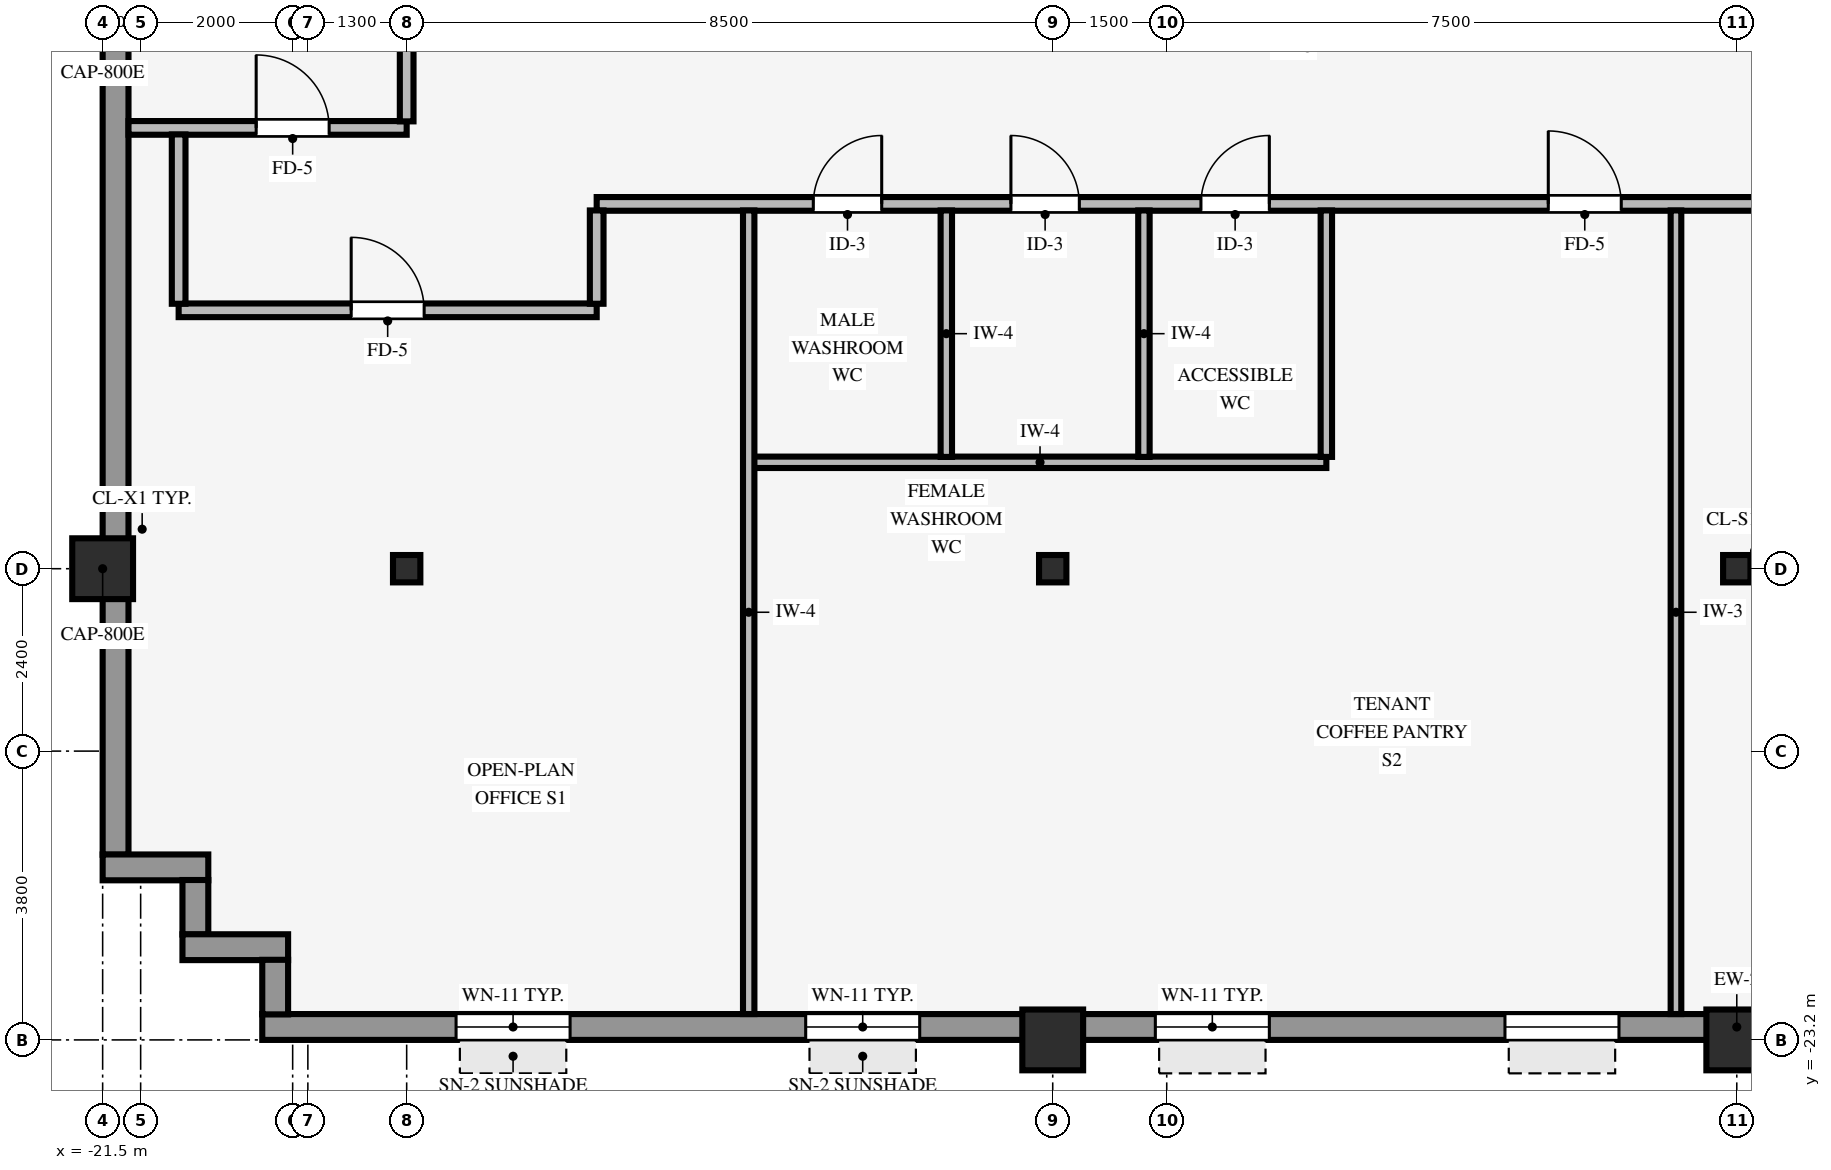
"""IFC4 building model, lengths in metres.
Left out: names, types, materials, properties, quantities, classifications, styles, units other than length and angle.
Written with IfcOpenShell. Run it as: python <this file> out.ifc"""

import sys

from ifc_helpers import new_model, si_unit, direction, frame, frame_2d, origin, origin_2d, place, context, subcontext, project, spatial, rectangle, hollow_rectangle, i_section, extrude, source, transform, mapped, element, fill, save


model = new_model("IFC4")
c1 = context("Model", 3, precision=1e-05, world=origin(), true_north=direction((0.0, 1.0)))
c2 = subcontext(c1, "Body", "Model", "MODEL_VIEW")
j1 = project(units=[si_unit("LENGTHUNIT", "METRE"), si_unit("PLANEANGLEUNIT", "RADIAN")], contexts=[c1])
p1 = place(None, origin())
s1 = spatial("IfcSite", under=j1, at=p1, CompositionType="ELEMENT")
p2 = place(p1, origin())
s2 = spatial("IfcBuilding", under=s1, at=p2, CompositionType="ELEMENT")
p3 = place(p2, frame((0.0, 0.0, 82.35)))
s3 = spatial("IfcBuildingStorey", under=s2, at=p3, CompositionType="ELEMENT", Elevation=82.35)
for number, where, z_axis, x_axis in (
    (1, (-21.5, -17.0, 0.0), (0.0, 0.0, 1.0), (1.0, 0.0, 0.0)),
    (2, (-9.0, -23.2, 0.0), (0.0, 0.0, 1.0), (1.0, 0.0, 0.0)),
    (3, (0.0, -23.2, 0.0), (0.0, 0.0, 1.0), (1.0, 0.0, 0.0)),
):
    element("IfcColumn", number, at=place(p3, frame(where, z_axis=z_axis, x_axis=x_axis)), inside=s3, PredefinedType="COLUMN", context=c2, shape_type="SweptSolid", body=[
        extrude(hollow_rectangle(XDim=0.8, YDim=0.8, WallThickness=0.055, InnerFilletRadius=0.055, OuterFilletRadius=0.11, at=origin_2d()), origin(), (0.0, 0.0, 1.0), 3.25),
    ])
for number, where, z_axis, x_axis in (
    (4, (0.0, -17.0, 0.0), (0.0, 0.0, 1.0), (1.0, 0.0, 0.0)),
    (5, (-17.5, -17.0, 0.0), (0.0, 0.0, 1.0), (1.0, 0.0, 0.0)),
    (6, (-9.0, -17.0, 0.0), (0.0, 0.0, 1.0), (1.0, 0.0, 0.0)),
):
    element("IfcColumn", number, at=place(p3, frame(where, z_axis=z_axis, x_axis=x_axis)), inside=s3, PredefinedType="COLUMN", context=c2, shape_type="SweptSolid", body=[
        extrude(i_section(OverallWidth=0.36, OverallDepth=0.36, WebThickness=0.021, FlangeThickness=0.021, FilletRadius=0.018, at=origin_2d()), origin(), (0.0, 0.0, 1.0), 3.25),
    ])
p4 = place(p3, frame((-19.4, -23.03, 0.0), z_axis=(0.0, 0.0, 1.0), x_axis=(1.0, 0.0, 0.0)))
e7 = element("IfcWall", 7, at=p4, inside=s3, PredefinedType="STANDARD", context=c2, shape_type="SweptSolid", body=[
    extrude(rectangle(XDim=38.8, YDim=0.34, at=frame_2d((19.4, 0.0))), origin(), (0.0, 0.0, 1.0), 2.585),
])
p5 = place(p4, frame((2.55, 0.0, 0.8)))
e8 = element("IfcOpeningElement", 8, at=p5, cuts=e7, PredefinedType="OPENING", context=c2, shape_type="SweptSolid", body=[
    extrude(rectangle(XDim=1.5, YDim=1.6, at=frame_2d((0.75, 0.8))), frame((0.0, 0.18, 0.0), z_axis=(0.0, -1.0, 0.0), x_axis=(1.0, 0.0, 0.0)), (0.0, 0.0, 1.0), 0.36),
])
p6 = place(p4, frame((7.15, 0.0, 0.8)))
e9 = element("IfcOpeningElement", 9, at=p6, cuts=e7, PredefinedType="OPENING", context=c2, shape_type="SweptSolid", body=[
    extrude(rectangle(XDim=1.5, YDim=1.6, at=frame_2d((0.75, 0.8))), frame((0.0, 0.18, 0.0), z_axis=(0.0, -1.0, 0.0), x_axis=(1.0, 0.0, 0.0)), (0.0, 0.0, 1.0), 0.36),
])
p7 = place(p4, frame((11.75, 0.0, 0.8)))
e10 = element("IfcOpeningElement", 10, at=p7, cuts=e7, PredefinedType="OPENING", context=c2, shape_type="SweptSolid", body=[
    extrude(rectangle(XDim=1.5, YDim=1.6, at=frame_2d((0.75, 0.8))), frame((0.0, 0.18, 0.0), z_axis=(0.0, -1.0, 0.0), x_axis=(1.0, 0.0, 0.0)), (0.0, 0.0, 1.0), 0.36),
])
p8 = place(p4, frame((16.35, 0.0, 0.8)))
e11 = element("IfcOpeningElement", 11, at=p8, cuts=e7, PredefinedType="OPENING", context=c2, shape_type="SweptSolid", body=[
    extrude(rectangle(XDim=1.5, YDim=1.6, at=frame_2d((0.75, 0.8))), frame((0.0, 0.18, 0.0), z_axis=(0.0, -1.0, 0.0), x_axis=(1.0, 0.0, 0.0)), (0.0, 0.0, 1.0), 0.36),
])
p9 = place(p4, frame((20.95, 0.0, 0.8)))
e12 = element("IfcOpeningElement", 12, at=p9, cuts=e7, PredefinedType="OPENING", context=c2, shape_type="SweptSolid", body=[
    extrude(rectangle(XDim=1.5, YDim=1.6, at=frame_2d((0.75, 0.8))), frame((0.0, 0.18, 0.0), z_axis=(0.0, -1.0, 0.0), x_axis=(1.0, 0.0, 0.0)), (0.0, 0.0, 1.0), 0.36),
])
p10 = place(p4, frame((25.55, 0.0, 0.8)))
e13 = element("IfcOpeningElement", 13, at=p10, cuts=e7, PredefinedType="OPENING", context=c2, shape_type="SweptSolid", body=[
    extrude(rectangle(XDim=1.5, YDim=1.6, at=frame_2d((0.75, 0.8))), frame((0.0, 0.18, 0.0), z_axis=(0.0, -1.0, 0.0), x_axis=(1.0, 0.0, 0.0)), (0.0, 0.0, 1.0), 0.36),
])
p11 = place(p4, frame((30.15, 0.0, 0.8)))
e14 = element("IfcOpeningElement", 14, at=p11, cuts=e7, PredefinedType="OPENING", context=c2, shape_type="SweptSolid", body=[
    extrude(rectangle(XDim=1.5, YDim=1.6, at=frame_2d((0.75, 0.8))), frame((0.0, 0.18, 0.0), z_axis=(0.0, -1.0, 0.0), x_axis=(1.0, 0.0, 0.0)), (0.0, 0.0, 1.0), 0.36),
])
p12 = place(p4, frame((34.75, 0.0, 0.8)))
e15 = element("IfcOpeningElement", 15, at=p12, cuts=e7, PredefinedType="OPENING", context=c2, shape_type="SweptSolid", body=[
    extrude(rectangle(XDim=1.5, YDim=1.6, at=frame_2d((0.75, 0.8))), frame((0.0, 0.18, 0.0), z_axis=(0.0, -1.0, 0.0), x_axis=(1.0, 0.0, 0.0)), (0.0, 0.0, 1.0), 0.36),
])
p13 = place(p3, frame((-21.33, -20.764, 0.0), z_axis=(0.0, 0.0, 1.0), x_axis=(0.0, 1.0, 0.0)))
e16 = element("IfcWall", 16, at=p13, inside=s3, PredefinedType="STANDARD", context=c2, shape_type="SweptSolid", body=[
    extrude(rectangle(XDim=41.528, YDim=0.34, at=frame_2d((20.764, 0.0))), origin(), (0.0, 0.0, 1.0), 3.24),
])
p14 = place(p13, frame((15.364, 0.0, 0.0)))
e17 = element("IfcOpeningElement", 17, at=p14, cuts=e16, PredefinedType="OPENING", context=c2, shape_type="SweptSolid", body=[
    extrude(rectangle(XDim=1.05, YDim=2.1, at=frame_2d((0.525, 1.05))), frame((0.0, 0.18, 0.0), z_axis=(0.0, -1.0, 0.0), x_axis=(1.0, 0.0, 0.0)), (0.0, 0.0, 1.0), 0.36),
])
p15 = place(p13, frame((17.144, 0.0, 0.8)))
e18 = element("IfcOpeningElement", 18, at=p15, cuts=e16, PredefinedType="OPENING", context=c2, shape_type="SweptSolid", body=[
    extrude(rectangle(XDim=2.3, YDim=1.62, at=frame_2d((1.15, 0.81))), frame((0.0, 0.18, 0.0), z_axis=(0.0, -1.0, 0.0), x_axis=(1.0, 0.0, 0.0)), (0.0, 0.0, 1.0), 0.36),
])
p16 = place(p13, frame((22.084, 0.0, 0.8)))
e19 = element("IfcOpeningElement", 19, at=p16, cuts=e16, PredefinedType="OPENING", context=c2, shape_type="SweptSolid", body=[
    extrude(rectangle(XDim=2.3, YDim=1.62, at=frame_2d((1.15, 0.81))), frame((0.0, 0.18, 0.0), z_axis=(0.0, -1.0, 0.0), x_axis=(1.0, 0.0, 0.0)), (0.0, 0.0, 1.0), 0.36),
])
p17 = place(p3, frame((-21.5, -20.93, 0.0), z_axis=(0.0, 0.0, 1.0), x_axis=(1.0, 0.0, 0.0)))
e20 = element("IfcWall", 20, at=p17, inside=s3, PredefinedType="STANDARD", context=c2, shape_type="SweptSolid", body=[
    extrude(rectangle(XDim=1.39, YDim=0.34, at=frame_2d((0.695, 0.0))), origin(), (0.0, 0.0, 1.0), 3.24),
])
p18 = place(p3, frame((-20.28, -21.814, 0.0), z_axis=(0.0, 0.0, 1.0), x_axis=(0.0, 1.0, 0.0)))
e21 = element("IfcWall", 21, at=p18, inside=s3, PredefinedType="STANDARD", context=c2, shape_type="SweptSolid", body=[
    extrude(rectangle(XDim=0.718, YDim=0.34, at=frame_2d((0.359, 0.0))), origin(), (0.0, 0.0, 1.0), 3.24),
])
p19 = place(p3, frame((-20.45, -21.98, 0.0), z_axis=(0.0, 0.0, 1.0), x_axis=(1.0, 0.0, 0.0)))
e22 = element("IfcWall", 22, at=p19, inside=s3, PredefinedType="STANDARD", context=c2, shape_type="SweptSolid", body=[
    extrude(rectangle(XDim=1.39, YDim=0.34, at=frame_2d((0.695, 0.0))), origin(), (0.0, 0.0, 1.0), 3.24),
])
p20 = place(p3, frame((-19.23, -22.864, 0.0), z_axis=(0.0, 0.0, 1.0), x_axis=(0.0, 1.0, 0.0)))
e23 = element("IfcWall", 23, at=p20, inside=s3, PredefinedType="STANDARD", context=c2, shape_type="SweptSolid", body=[
    extrude(rectangle(XDim=0.718, YDim=0.34, at=frame_2d((0.359, 0.0))), origin(), (0.0, 0.0, 1.0), 3.24),
])
p21 = place(p3, frame((-12.934, -15.6, 0.0), z_axis=(0.0, 0.0, 1.0), x_axis=(1.0, 0.0, 0.0)))
e24 = element("IfcWall", 24, at=p21, inside=s3, PredefinedType="PARTITIONING", context=c2, shape_type="SweptSolid", body=[
    extrude(rectangle(XDim=7.534, YDim=0.15, at=frame_2d((3.767, 0.0))), origin(), (0.0, 0.0, 1.0), 3.24),
])
p22 = place(p3, frame((-20.5, -13.6, 0.0), z_axis=(0.0, 0.0, 1.0), x_axis=(1.0, 0.0, 0.0)))
e25 = element("IfcWall", 25, at=p22, inside=s3, PredefinedType="PARTITIONING", context=c2, shape_type="SweptSolid", body=[
    extrude(rectangle(XDim=5.5, YDim=0.18, at=frame_2d((2.75, 0.0))), origin(), (0.0, 0.0, 1.0), 2.878),
])
p23 = place(p22, frame((2.27, 0.0, 0.0)))
e26 = element("IfcOpeningElement", 26, at=p23, cuts=e25, PredefinedType="OPENING", context=c2, shape_type="SweptSolid", body=[
    extrude(rectangle(XDim=0.96, YDim=2.1, at=frame_2d((0.48, 1.05))), frame((0.0, 0.1, 0.0), z_axis=(0.0, -1.0, 0.0), x_axis=(1.0, 0.0, 0.0)), (0.0, 0.0, 1.0), 0.2),
])
p24 = place(p3, frame((-15.0, -12.2, 0.0), z_axis=(0.0, 0.0, 1.0), x_axis=(1.0, 0.0, 0.0)))
e27 = element("IfcWall", 27, at=p24, inside=s3, PredefinedType="PARTITIONING", context=c2, shape_type="SweptSolid", body=[
    extrude(rectangle(XDim=30.0, YDim=0.18, at=frame_2d((15.0, 0.0))), origin(), (0.0, 0.0, 1.0), 3.24),
])
p25 = place(p24, frame((19.07, 0.0, 0.0)))
e28 = element("IfcOpeningElement", 28, at=p25, cuts=e27, PredefinedType="OPENING", context=c2, shape_type="SweptSolid", body=[
    extrude(rectangle(XDim=0.96, YDim=2.1, at=frame_2d((0.48, 1.05))), frame((0.0, 0.1, 0.0), z_axis=(0.0, -1.0, 0.0), x_axis=(1.0, 0.0, 0.0)), (0.0, 0.0, 1.0), 0.2),
])
p26 = place(p24, frame((5.45, 0.0, 0.0)))
e29 = element("IfcOpeningElement", 29, at=p26, cuts=e27, PredefinedType="OPENING", context=c2, shape_type="SweptSolid", body=[
    extrude(rectangle(XDim=0.9, YDim=2.1, at=frame_2d((0.45, 1.05))), frame((0.0, 0.1, 0.0), z_axis=(0.0, -1.0, 0.0), x_axis=(1.0, 0.0, 0.0)), (0.0, 0.0, 1.0), 0.2),
])
p27 = place(p24, frame((2.85, 0.0, 0.0)))
e30 = element("IfcOpeningElement", 30, at=p27, cuts=e27, PredefinedType="OPENING", context=c2, shape_type="SweptSolid", body=[
    extrude(rectangle(XDim=0.9, YDim=2.1, at=frame_2d((0.45, 1.05))), frame((0.0, 0.1, 0.0), z_axis=(0.0, -1.0, 0.0), x_axis=(1.0, 0.0, 0.0)), (0.0, 0.0, 1.0), 0.2),
])
p28 = place(p24, frame((12.52, 0.0, 0.0)))
e31 = element("IfcOpeningElement", 31, at=p28, cuts=e27, PredefinedType="OPENING", context=c2, shape_type="SweptSolid", body=[
    extrude(rectangle(XDim=0.96, YDim=2.1, at=frame_2d((0.48, 1.05))), frame((0.0, 0.1, 0.0), z_axis=(0.0, -1.0, 0.0), x_axis=(1.0, 0.0, 0.0)), (0.0, 0.0, 1.0), 0.2),
])
p29 = place(p24, frame((7.95, 0.0, 0.0)))
e32 = element("IfcOpeningElement", 32, at=p29, cuts=e27, PredefinedType="OPENING", context=c2, shape_type="SweptSolid", body=[
    extrude(rectangle(XDim=0.9, YDim=2.1, at=frame_2d((0.45, 1.05))), frame((0.0, 0.1, 0.0), z_axis=(0.0, -1.0, 0.0), x_axis=(1.0, 0.0, 0.0)), (0.0, 0.0, 1.0), 0.2),
])
p30 = place(p3, frame((-21.16, -11.2, 0.0), z_axis=(0.0, 0.0, 1.0), x_axis=(1.0, 0.0, 0.0)))
e33 = element("IfcWall", 33, at=p30, inside=s3, PredefinedType="PARTITIONING", context=c2, shape_type="SweptSolid", body=[
    extrude(rectangle(XDim=3.66, YDim=0.18, at=frame_2d((1.83, 0.0))), origin(), (0.0, 0.0, 1.0), 3.24),
])
p31 = place(p30, frame((1.68, 0.0, 0.0)))
e34 = element("IfcOpeningElement", 34, at=p31, cuts=e33, PredefinedType="OPENING", context=c2, shape_type="SweptSolid", body=[
    extrude(rectangle(XDim=0.96, YDim=2.1, at=frame_2d((0.48, 1.05))), frame((0.0, 0.1, 0.0), z_axis=(0.0, -1.0, 0.0), x_axis=(1.0, 0.0, 0.0)), (0.0, 0.0, 1.0), 0.2),
])
p32 = place(p3, frame((-20.5, -13.514, 0.0), z_axis=(0.0, 0.0, 1.0), x_axis=(0.0, 1.0, 0.0)))
e35 = element("IfcWall", 35, at=p32, inside=s3, PredefinedType="PARTITIONING", context=c2, shape_type="SweptSolid", body=[
    extrude(rectangle(XDim=2.228, YDim=0.18, at=frame_2d((1.114, 0.0))), origin(), (0.0, 0.0, 1.0), 3.24),
])
p33 = place(p3, frame((-17.5, -11.114, 0.0), z_axis=(0.0, 0.0, 1.0), x_axis=(0.0, 1.0, 0.0)))
e36 = element("IfcWall", 36, at=p33, inside=s3, PredefinedType="PARTITIONING", context=c2, shape_type="SweptSolid", body=[
    extrude(rectangle(XDim=0.968, YDim=0.18, at=frame_2d((0.484, 0.0))), origin(), (0.0, 0.0, 1.0), 2.618),
])
p34 = place(p3, frame((-15.0, -13.514, 0.0), z_axis=(0.0, 0.0, 1.0), x_axis=(0.0, 1.0, 0.0)))
e37 = element("IfcWall", 37, at=p34, inside=s3, PredefinedType="PARTITIONING", context=c2, shape_type="SweptSolid", body=[
    extrude(rectangle(XDim=1.228, YDim=0.18, at=frame_2d((0.614, 0.0))), origin(), (0.0, 0.0, 1.0), 3.24),
])
p35 = place(p3, frame((-13.0, -22.86, 0.0), z_axis=(0.0, 0.0, 1.0), x_axis=(0.0, 1.0, 0.0)))
e38 = element("IfcWall", 38, at=p35, inside=s3, PredefinedType="PARTITIONING", context=c2, shape_type="SweptSolid", body=[
    extrude(rectangle(XDim=10.574, YDim=0.15, at=frame_2d((5.287, 0.0))), origin(), (0.0, 0.0, 1.0), 3.24),
])
for number, where, z_axis, x_axis in (
    (39, (-10.4, -15.529, 0.0), (0.0, 0.0, 1.0), (0.0, 1.0, 0.0)),
    (40, (-7.8, -15.529, 0.0), (0.0, 0.0, 1.0), (0.0, 1.0, 0.0)),
    (41, (-5.4, -15.529, 0.0), (0.0, 0.0, 1.0), (0.0, 1.0, 0.0)),
):
    element("IfcWall", number, at=place(p3, frame(where, z_axis=z_axis, x_axis=x_axis)), inside=s3, PredefinedType="PARTITIONING", context=c2, shape_type="SweptSolid", body=[
        extrude(rectangle(XDim=3.243, YDim=0.15, at=frame_2d((1.622, 0.0))), origin(), (0.0, 0.0, 1.0), 3.24),
    ])
p36 = place(p3, frame((-0.8, -22.86, 0.0), z_axis=(0.0, 0.0, 1.0), x_axis=(0.0, 1.0, 0.0)))
e42 = element("IfcWall", 42, at=p36, inside=s3, PredefinedType="PARTITIONING", context=c2, shape_type="SweptSolid", body=[
    extrude(rectangle(XDim=10.574, YDim=0.14, at=frame_2d((5.287, 0.0))), origin(), (0.0, 0.0, 1.0), 3.24),
])
m1 = source(origin(), c2, "Body", "SweptSolid", [
    extrude(rectangle(XDim=1.5, YDim=1.6, at=frame_2d((0.75, 0.8))), frame((0.0, 0.03, 0.0), z_axis=(0.0, -1.0, 0.0), x_axis=(1.0, 0.0, 0.0)), (0.0, 0.0, 1.0), 0.06),
])
p37 = place(p5, origin())
e43 = element("IfcWindow", 43, at=p37, inside=s3, PartitioningType="SINGLE_PANEL", PredefinedType="WINDOW", context=c2, shape_type="MappedRepresentation", body=[
    mapped(m1, transform((0.0, 0.0, 0.0), scale=1.0)),
])
fill(e8, e43)
p38 = place(p6, origin())
e44 = element("IfcWindow", 44, at=p38, inside=s3, PartitioningType="SINGLE_PANEL", PredefinedType="WINDOW", context=c2, shape_type="MappedRepresentation", body=[
    mapped(m1, transform((0.0, 0.0, 0.0), scale=1.0)),
])
fill(e9, e44)
p39 = place(p7, origin())
e45 = element("IfcWindow", 45, at=p39, inside=s3, PartitioningType="SINGLE_PANEL", PredefinedType="WINDOW", context=c2, shape_type="MappedRepresentation", body=[
    mapped(m1, transform((0.0, 0.0, 0.0), scale=1.0)),
])
fill(e10, e45)
p40 = place(p8, origin())
e46 = element("IfcWindow", 46, at=p40, inside=s3, PartitioningType="SINGLE_PANEL", PredefinedType="WINDOW", context=c2, shape_type="MappedRepresentation", body=[
    mapped(m1, transform((0.0, 0.0, 0.0), scale=1.0)),
])
fill(e11, e46)
m2 = source(origin(), c2, "Body", "SweptSolid", [
    extrude(rectangle(XDim=0.96, YDim=2.1, at=frame_2d((0.48, 1.05))), frame((0.0, 0.025, 0.0), z_axis=(0.0, -1.0, 0.0), x_axis=(1.0, 0.0, 0.0)), (0.0, 0.0, 1.0), 0.05),
])
p41 = place(p23, origin())
e47 = element("IfcDoor", 47, at=p41, inside=s3, OperationType="SINGLE_SWING_LEFT", PredefinedType="DOOR", context=c2, shape_type="MappedRepresentation", body=[
    mapped(m2, transform((0.0, 0.0, 0.0), scale=1.0)),
])
fill(e26, e47)
p42 = place(p31, origin())
e48 = element("IfcDoor", 48, at=p42, inside=s3, OperationType="SINGLE_SWING_LEFT", PredefinedType="DOOR", context=c2, shape_type="MappedRepresentation", body=[
    mapped(m2, transform((0.0, 0.0, 0.0), scale=1.0)),
])
fill(e34, e48)
m3 = source(origin(), c2, "Body", "SweptSolid", [
    extrude(rectangle(XDim=0.9, YDim=2.1, at=frame_2d((0.45, 1.05))), frame((0.0, 0.025, 0.0), z_axis=(0.0, -1.0, 0.0), x_axis=(1.0, 0.0, 0.0)), (0.0, 0.0, 1.0), 0.05),
])
p43 = place(p26, origin())
e49 = element("IfcDoor", 49, at=p43, inside=s3, OperationType="SINGLE_SWING_LEFT", PredefinedType="DOOR", context=c2, shape_type="MappedRepresentation", body=[
    mapped(m3, transform((0.0, 0.0, 0.0), scale=1.0)),
])
fill(e29, e49)
p44 = place(p27, origin())
e50 = element("IfcDoor", 50, at=p44, inside=s3, OperationType="SINGLE_SWING_RIGHT", PredefinedType="DOOR", context=c2, shape_type="MappedRepresentation", body=[
    mapped(m3, transform((0.0, 0.0, 0.0), scale=1.0)),
])
fill(e30, e50)
p45 = place(p28, origin())
e51 = element("IfcDoor", 51, at=p45, inside=s3, OperationType="SINGLE_SWING_LEFT", PredefinedType="DOOR", context=c2, shape_type="MappedRepresentation", body=[
    mapped(m2, transform((0.0, 0.0, 0.0), scale=1.0)),
])
fill(e31, e51)
p46 = place(p29, origin())
e52 = element("IfcDoor", 52, at=p46, inside=s3, OperationType="SINGLE_SWING_RIGHT", PredefinedType="DOOR", context=c2, shape_type="MappedRepresentation", body=[
    mapped(m3, transform((0.0, 0.0, 0.0), scale=1.0)),
])
fill(e32, e52)
save(model, sys.argv[1])
